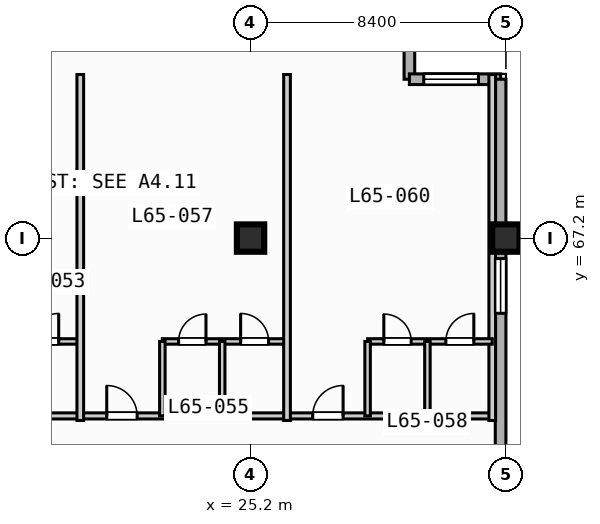
"""IFC4 building model, lengths in metres.
Left out: names, types, materials, properties, quantities, classifications, styles, units other than length and angle.
Written with IfcOpenShell. Run it as: python <this file> out.ifc"""

import sys

from ifc_helpers import new_model, si_unit, direction, frame, frame_2d, origin, origin_2d, place, context, subcontext, project, spatial, rectangle, extrude, element, fill, save


model = new_model("IFC4")
c1 = context("Model", 3, precision=1e-05, world=origin(), true_north=direction((0.0, 1.0)))
c2 = subcontext(c1, "Body", "Model", "MODEL_VIEW")
j1 = project(units=[si_unit("LENGTHUNIT", "METRE"), si_unit("PLANEANGLEUNIT", "RADIAN")], contexts=[c1])
p1 = place(None, origin())
s1 = spatial("IfcSite", under=j1, at=p1, CompositionType="ELEMENT")
p2 = place(p1, origin())
s2 = spatial("IfcBuilding", under=s1, at=p2, CompositionType="ELEMENT")
p3 = place(p2, frame((0.0, 0.0, 263.8)))
s3 = spatial("IfcBuildingStorey", under=s2, at=p3, CompositionType="ELEMENT", Elevation=263.8)
for number, where, z_axis, x_axis in (
    (1, (25.2, 67.2, 0.0), (0.0, 0.0, 1.0), (1.0, 0.0, 0.0)),
    (2, (33.6, 67.2, 0.0), (0.0, 0.0, 1.0), (1.0, 0.0, 0.0)),
):
    element("IfcColumn", number, at=place(p3, frame(where, z_axis=z_axis, x_axis=x_axis)), inside=s3, PredefinedType="COLUMN", context=c2, shape_type="SweptSolid", body=[
        extrude(rectangle(XDim=0.9, YDim=0.9, at=origin_2d()), origin(), (0.0, 0.0, 1.0), 3.7),
    ])
p4 = place(p3, frame((30.425, 75.425, 0.0), z_axis=(0.0, 0.0, 1.0), x_axis=(0.0, -1.0, 0.0)))
e3 = element("IfcWall", 3, at=p4, inside=s3, PredefinedType="STANDARD", context=c2, shape_type="SweptSolid", body=[
    extrude(rectangle(XDim=3.0, YDim=0.35, at=frame_2d((1.5, 0.0))), origin(), (0.0, 0.0, 1.0), 3.47),
])
p5 = place(p3, frame((30.425, 72.425, 0.0), z_axis=(0.0, 0.0, 1.0), x_axis=(1.0, 0.0, 0.0)))
e4 = element("IfcWall", 4, at=p5, inside=s3, PredefinedType="STANDARD", context=c2, shape_type="SweptSolid", body=[
    extrude(rectangle(XDim=3.0, YDim=0.35, at=frame_2d((1.5, 0.0))), origin(), (0.0, 0.0, 1.0), 3.47),
])
p6 = place(p5, frame((0.472, 0.0, 0.85)))
e5 = element("IfcOpeningElement", 5, at=p6, cuts=e4, PredefinedType="OPENING", context=c2, shape_type="SweptSolid", body=[
    extrude(rectangle(XDim=1.8, YDim=1.8, at=frame_2d((0.9, 0.9))), frame((0.0, 0.185, 0.0), z_axis=(0.0, -1.0, 0.0), x_axis=(1.0, 0.0, 0.0)), (0.0, 0.0, 1.0), 0.37),
])
p7 = place(p3, frame((33.425, 72.425, 0.0), z_axis=(0.0, 0.0, 1.0), x_axis=(0.0, -1.0, 0.0)))
e6 = element("IfcWall", 6, at=p7, inside=s3, PredefinedType="STANDARD", context=c2, shape_type="SweptSolid", body=[
    extrude(rectangle(XDim=39.0, YDim=0.35, at=frame_2d((19.5, 0.0))), origin(), (0.0, 0.0, 1.0), 3.47),
])
p8 = place(p7, frame((5.9, 0.0, 0.85)))
e7 = element("IfcOpeningElement", 7, at=p8, cuts=e6, PredefinedType="OPENING", context=c2, shape_type="SweptSolid", body=[
    extrude(rectangle(XDim=1.8, YDim=1.8, at=frame_2d((0.9, 0.9))), frame((0.0, 0.185, 0.0), z_axis=(0.0, -1.0, 0.0), x_axis=(1.0, 0.0, 0.0)), (0.0, 0.0, 1.0), 0.37),
])
p9 = place(p3, frame((11.8, 61.35, 0.0), z_axis=(0.0, 0.0, 1.0), x_axis=(1.0, 0.0, 0.0)))
e8 = element("IfcWall", 8, at=p9, inside=s3, PredefinedType="PARTITIONING", context=c2, shape_type="SweptSolid", body=[
    extrude(rectangle(XDim=21.35, YDim=0.2, at=frame_2d((10.675, 0.0))), origin(), (0.0, 0.0, 1.0), 3.47),
])
p10 = place(p9, frame((1.17, 0.0, 0.0)))
e9 = element("IfcOpeningElement", 9, at=p10, cuts=e8, PredefinedType="OPENING", context=c2, shape_type="SweptSolid", body=[
    extrude(rectangle(XDim=1.0, YDim=2.15, at=frame_2d((0.5, 1.075))), frame((0.0, 0.11, 0.0), z_axis=(0.0, -1.0, 0.0), x_axis=(1.0, 0.0, 0.0)), (0.0, 0.0, 1.0), 0.22),
])
p11 = place(p9, frame((8.67, 0.0, 0.0)))
e10 = element("IfcOpeningElement", 10, at=p11, cuts=e8, PredefinedType="OPENING", context=c2, shape_type="SweptSolid", body=[
    extrude(rectangle(XDim=1.0, YDim=2.15, at=frame_2d((0.5, 1.075))), frame((0.0, 0.11, 0.0), z_axis=(0.0, -1.0, 0.0), x_axis=(1.0, 0.0, 0.0)), (0.0, 0.0, 1.0), 0.22),
])
p12 = place(p9, frame((15.445, 0.0, 0.0)))
e11 = element("IfcOpeningElement", 11, at=p12, cuts=e8, PredefinedType="OPENING", context=c2, shape_type="SweptSolid", body=[
    extrude(rectangle(XDim=1.0, YDim=2.15, at=frame_2d((0.5, 1.075))), frame((0.0, 0.11, 0.0), z_axis=(0.0, -1.0, 0.0), x_axis=(1.0, 0.0, 0.0)), (0.0, 0.0, 1.0), 0.22),
])
p13 = place(p3, frame((15.1, 63.8, 0.0), z_axis=(0.0, 0.0, 1.0), x_axis=(1.0, 0.0, 0.0)))
e12 = element("IfcWall", 12, at=p13, inside=s3, PredefinedType="PLUMBINGWALL", context=c2, shape_type="SweptSolid", body=[
    extrude(rectangle(XDim=4.5, YDim=0.18, at=frame_2d((2.25, 0.0))), origin(), (0.0, 0.0, 1.0), 3.47),
])
p14 = place(p13, frame((0.63, 0.0, 0.0)))
e13 = element("IfcOpeningElement", 13, at=p14, cuts=e12, PredefinedType="OPENING", context=c2, shape_type="SweptSolid", body=[
    extrude(rectangle(XDim=0.9, YDim=2.1, at=frame_2d((0.45, 1.05))), frame((0.0, 0.1, 0.0), z_axis=(0.0, -1.0, 0.0), x_axis=(1.0, 0.0, 0.0)), (0.0, 0.0, 1.0), 0.2),
])
p15 = place(p13, frame((2.87, 0.0, 0.0)))
e14 = element("IfcOpeningElement", 14, at=p15, cuts=e12, PredefinedType="OPENING", context=c2, shape_type="SweptSolid", body=[
    extrude(rectangle(XDim=0.92, YDim=2.1, at=frame_2d((0.46, 1.05))), frame((0.0, 0.1, 0.0), z_axis=(0.0, -1.0, 0.0), x_axis=(1.0, 0.0, 0.0)), (0.0, 0.0, 1.0), 0.2),
])
p16 = place(p3, frame((19.6, 61.2, 0.0), z_axis=(0.0, 0.0, 1.0), x_axis=(0.0, 1.0, 0.0)))
e15 = element("IfcWall", 15, at=p16, inside=s3, PredefinedType="PARTITIONING", context=c2, shape_type="SweptSolid", body=[
    extrude(rectangle(XDim=11.38, YDim=0.22, at=frame_2d((5.69, 0.0))), origin(), (0.0, 0.0, 1.0), 3.47),
])
p17 = place(p3, frame((22.3, 63.8, 0.0), z_axis=(0.0, 0.0, 1.0), x_axis=(1.0, 0.0, 0.0)))
e16 = element("IfcWall", 16, at=p17, inside=s3, PredefinedType="PLUMBINGWALL", context=c2, shape_type="SweptSolid", body=[
    extrude(rectangle(XDim=4.1, YDim=0.18, at=frame_2d((2.05, 0.0))), origin(), (0.0, 0.0, 1.0), 3.47),
])
p18 = place(p17, frame((0.534, 0.0, 0.0)))
e17 = element("IfcOpeningElement", 17, at=p18, cuts=e16, PredefinedType="OPENING", context=c2, shape_type="SweptSolid", body=[
    extrude(rectangle(XDim=0.9, YDim=2.1, at=frame_2d((0.45, 1.05))), frame((0.0, 0.1, 0.0), z_axis=(0.0, -1.0, 0.0), x_axis=(1.0, 0.0, 0.0)), (0.0, 0.0, 1.0), 0.2),
])
p19 = place(p17, frame((2.574, 0.0, 0.0)))
e18 = element("IfcOpeningElement", 18, at=p19, cuts=e16, PredefinedType="OPENING", context=c2, shape_type="SweptSolid", body=[
    extrude(rectangle(XDim=0.92, YDim=2.1, at=frame_2d((0.46, 1.05))), frame((0.0, 0.1, 0.0), z_axis=(0.0, -1.0, 0.0), x_axis=(1.0, 0.0, 0.0)), (0.0, 0.0, 1.0), 0.2),
])
for number, where, z_axis, x_axis in (
    (19, (22.3, 61.35, 0.0), (0.0, 0.0, 1.0), (0.0, 1.0, 0.0)),
    (20, (24.268, 61.35, 0.0), (0.0, 0.0, 1.0), (0.0, 1.0, 0.0)),
):
    element("IfcWall", number, at=place(p3, frame(where, z_axis=z_axis, x_axis=x_axis)), inside=s3, PredefinedType="PLUMBINGWALL", context=c2, shape_type="SweptSolid", body=[
        extrude(rectangle(XDim=2.45, YDim=0.18, at=frame_2d((1.225, 0.0))), origin(), (0.0, 0.0, 1.0), 3.47),
    ])
for number, where, z_axis, x_axis in (
    (21, (26.4, 61.2, 0.0), (0.0, 0.0, 1.0), (0.0, 1.0, 0.0)),
    (22, (33.15, 61.2, 0.0), (0.0, 0.0, 1.0), (0.0, 1.0, 0.0)),
):
    element("IfcWall", number, at=place(p3, frame(where, z_axis=z_axis, x_axis=x_axis)), inside=s3, PredefinedType="PARTITIONING", context=c2, shape_type="SweptSolid", body=[
        extrude(rectangle(XDim=11.38, YDim=0.22, at=frame_2d((5.69, 0.0))), origin(), (0.0, 0.0, 1.0), 3.47),
    ])
p20 = place(p3, frame((29.05, 63.8, 0.0), z_axis=(0.0, 0.0, 1.0), x_axis=(1.0, 0.0, 0.0)))
e23 = element("IfcWall", 23, at=p20, inside=s3, PredefinedType="PLUMBINGWALL", context=c2, shape_type="SweptSolid", body=[
    extrude(rectangle(XDim=4.1, YDim=0.18, at=frame_2d((2.05, 0.0))), origin(), (0.0, 0.0, 1.0), 3.47),
])
p21 = place(p20, frame((0.534, 0.0, 0.0)))
e24 = element("IfcOpeningElement", 24, at=p21, cuts=e23, PredefinedType="OPENING", context=c2, shape_type="SweptSolid", body=[
    extrude(rectangle(XDim=0.9, YDim=2.1, at=frame_2d((0.45, 1.05))), frame((0.0, 0.1, 0.0), z_axis=(0.0, -1.0, 0.0), x_axis=(1.0, 0.0, 0.0)), (0.0, 0.0, 1.0), 0.2),
])
p22 = place(p20, frame((2.574, 0.0, 0.0)))
e25 = element("IfcOpeningElement", 25, at=p22, cuts=e23, PredefinedType="OPENING", context=c2, shape_type="SweptSolid", body=[
    extrude(rectangle(XDim=0.92, YDim=2.1, at=frame_2d((0.46, 1.05))), frame((0.0, 0.1, 0.0), z_axis=(0.0, -1.0, 0.0), x_axis=(1.0, 0.0, 0.0)), (0.0, 0.0, 1.0), 0.2),
])
for number, where, z_axis, x_axis in (
    (26, (29.05, 61.35, 0.0), (0.0, 0.0, 1.0), (0.0, 1.0, 0.0)),
    (27, (31.018, 61.35, 0.0), (0.0, 0.0, 1.0), (0.0, 1.0, 0.0)),
):
    element("IfcWall", number, at=place(p3, frame(where, z_axis=z_axis, x_axis=x_axis)), inside=s3, PredefinedType="PLUMBINGWALL", context=c2, shape_type="SweptSolid", body=[
        extrude(rectangle(XDim=2.45, YDim=0.18, at=frame_2d((1.225, 0.0))), origin(), (0.0, 0.0, 1.0), 3.47),
    ])
p23 = place(p6, origin())
e28 = element("IfcWindow", 28, at=p23, inside=s3, PartitioningType="SINGLE_PANEL", PredefinedType="WINDOW", context=c2, shape_type="SweptSolid", body=[
    extrude(rectangle(XDim=1.8, YDim=1.8, at=frame_2d((0.9, 0.9))), frame((0.0, 0.03, 0.0), z_axis=(0.0, -1.0, 0.0), x_axis=(1.0, 0.0, 0.0)), (0.0, 0.0, 1.0), 0.06),
])
fill(e5, e28)
p24 = place(p8, origin())
e29 = element("IfcWindow", 29, at=p24, inside=s3, PartitioningType="SINGLE_PANEL", PredefinedType="WINDOW", context=c2, shape_type="SweptSolid", body=[
    extrude(rectangle(XDim=1.8, YDim=1.8, at=frame_2d((0.9, 0.9))), frame((0.0, 0.03, 0.0), z_axis=(0.0, -1.0, 0.0), x_axis=(1.0, 0.0, 0.0)), (0.0, 0.0, 1.0), 0.06),
])
fill(e7, e29)
p25 = place(p11, origin())
e30 = element("IfcDoor", 30, at=p25, inside=s3, OperationType="SINGLE_SWING_LEFT", PredefinedType="DOOR", context=c2, shape_type="SweptSolid", body=[
    extrude(rectangle(XDim=1.0, YDim=2.15, at=frame_2d((0.5, 1.075))), frame((0.0, 0.025, 0.0), z_axis=(0.0, -1.0, 0.0), x_axis=(1.0, 0.0, 0.0)), (0.0, 0.0, 1.0), 0.05),
])
fill(e10, e30)
p26 = place(p12, origin())
e31 = element("IfcDoor", 31, at=p26, inside=s3, OperationType="SINGLE_SWING_RIGHT", PredefinedType="DOOR", context=c2, shape_type="SweptSolid", body=[
    extrude(rectangle(XDim=1.0, YDim=2.15, at=frame_2d((0.5, 1.075))), frame((0.0, 0.025, 0.0), z_axis=(0.0, -1.0, 0.0), x_axis=(1.0, 0.0, 0.0)), (0.0, 0.0, 1.0), 0.05),
])
fill(e11, e31)
p27 = place(p15, origin())
e32 = element("IfcDoor", 32, at=p27, inside=s3, OperationType="SINGLE_SWING_RIGHT", PredefinedType="DOOR", context=c2, shape_type="SweptSolid", body=[
    extrude(rectangle(XDim=0.92, YDim=2.1, at=frame_2d((0.46, 1.05))), frame((0.0, 0.025, 0.0), z_axis=(0.0, -1.0, 0.0), x_axis=(1.0, 0.0, 0.0)), (0.0, 0.0, 1.0), 0.05),
])
fill(e14, e32)
p28 = place(p18, origin())
e33 = element("IfcDoor", 33, at=p28, inside=s3, OperationType="SINGLE_SWING_RIGHT", PredefinedType="DOOR", context=c2, shape_type="SweptSolid", body=[
    extrude(rectangle(XDim=0.9, YDim=2.1, at=frame_2d((0.45, 1.05))), frame((0.0, 0.025, 0.0), z_axis=(0.0, -1.0, 0.0), x_axis=(1.0, 0.0, 0.0)), (0.0, 0.0, 1.0), 0.05),
])
fill(e17, e33)
p29 = place(p19, origin())
e34 = element("IfcDoor", 34, at=p29, inside=s3, OperationType="SINGLE_SWING_LEFT", PredefinedType="DOOR", context=c2, shape_type="SweptSolid", body=[
    extrude(rectangle(XDim=0.92, YDim=2.1, at=frame_2d((0.46, 1.05))), frame((0.0, 0.025, 0.0), z_axis=(0.0, -1.0, 0.0), x_axis=(1.0, 0.0, 0.0)), (0.0, 0.0, 1.0), 0.05),
])
fill(e18, e34)
p30 = place(p21, origin())
e35 = element("IfcDoor", 35, at=p30, inside=s3, OperationType="SINGLE_SWING_LEFT", PredefinedType="DOOR", context=c2, shape_type="SweptSolid", body=[
    extrude(rectangle(XDim=0.9, YDim=2.1, at=frame_2d((0.45, 1.05))), frame((0.0, 0.025, 0.0), z_axis=(0.0, -1.0, 0.0), x_axis=(1.0, 0.0, 0.0)), (0.0, 0.0, 1.0), 0.05),
])
fill(e24, e35)
p31 = place(p22, origin())
e36 = element("IfcDoor", 36, at=p31, inside=s3, OperationType="SINGLE_SWING_RIGHT", PredefinedType="DOOR", context=c2, shape_type="SweptSolid", body=[
    extrude(rectangle(XDim=0.92, YDim=2.1, at=frame_2d((0.46, 1.05))), frame((0.0, 0.025, 0.0), z_axis=(0.0, -1.0, 0.0), x_axis=(1.0, 0.0, 0.0)), (0.0, 0.0, 1.0), 0.05),
])
fill(e25, e36)
save(model, sys.argv[1])
